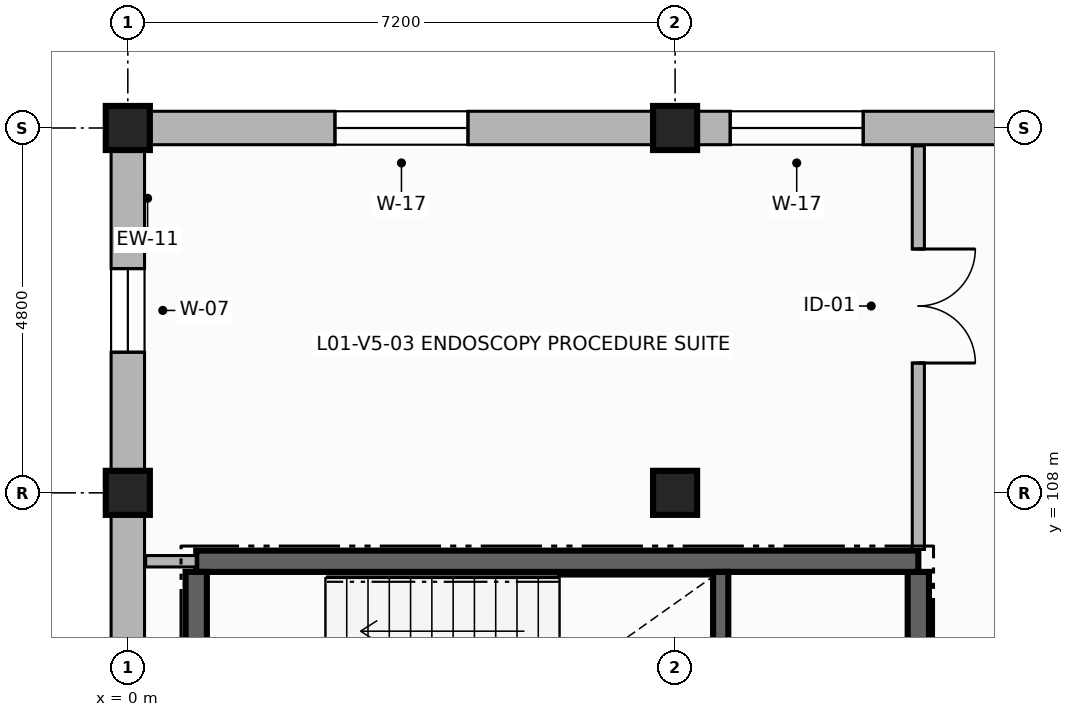
"""IFC4 building model, lengths in metres.
Left out: names, types, materials, properties, quantities, classifications, styles, units other than length and angle.
Written with IfcOpenShell. Run it as: python <this file> out.ifc"""

import sys

from ifc_helpers import new_model, si_unit, direction, frame, frame_2d, origin, origin_2d, place, context, subcontext, project, spatial, rectangle, extrude, element, fill, save


model = new_model("IFC4")
c1 = context("Model", 3, precision=1e-05, world=origin(), true_north=direction((0.0, 1.0)))
c2 = subcontext(c1, "Body", "Model", "MODEL_VIEW")
j1 = project(units=[si_unit("LENGTHUNIT", "METRE"), si_unit("PLANEANGLEUNIT", "RADIAN")], contexts=[c1])
p1 = place(None, origin())
s1 = spatial("IfcSite", under=j1, at=p1, CompositionType="ELEMENT")
p2 = place(p1, origin())
s2 = spatial("IfcBuilding", under=s1, at=p2, CompositionType="ELEMENT")
p3 = place(p2, frame((0.0, 0.0, 4.5)))
s3 = spatial("IfcBuildingStorey", under=s2, at=p3, CompositionType="ELEMENT", Elevation=4.5)
for number, where, z_axis, x_axis in (
    (1, (0.0, 108.0, 0.0), (0.0, 0.0, 1.0), (1.0, 0.0, 0.0)),
    (2, (0.0, 112.8, 0.0), (0.0, 0.0, 1.0), (1.0, 0.0, 0.0)),
    (3, (7.2, 108.0, 0.0), (0.0, 0.0, 1.0), (1.0, 0.0, 0.0)),
    (4, (7.2, 112.8, 0.0), (0.0, 0.0, 1.0), (1.0, 0.0, 0.0)),
):
    element("IfcColumn", number, at=place(p3, frame(where, z_axis=z_axis, x_axis=x_axis)), inside=s3, PredefinedType="COLUMN", context=c2, shape_type="SweptSolid", body=[
        extrude(rectangle(XDim=0.58, YDim=0.58, at=origin_2d()), origin(), (0.0, 0.0, 1.0), 3.59),
    ])
p4 = place(p3, frame((14.4, 112.8, 0.0), z_axis=(0.0, 0.0, 1.0), x_axis=(-1.0, 0.0, 0.0)))
e5 = element("IfcWall", 5, at=p4, inside=s3, PredefinedType="SOLIDWALL", context=c2, shape_type="SweptSolid", body=[
    extrude(rectangle(XDim=7.2, YDim=0.44, at=frame_2d((3.6, 0.0))), origin(), (0.0, 0.0, 1.0), 2.92),
])
p5 = place(p4, frame((4.725, 0.0, 0.9)))
e6 = element("IfcOpeningElement", 6, at=p5, cuts=e5, PredefinedType="OPENING", context=c2, shape_type="SweptSolid", body=[
    extrude(rectangle(XDim=1.75, YDim=1.8, at=frame_2d((0.875, 0.9))), frame((0.0, 0.23, 0.0), z_axis=(0.0, -1.0, 0.0), x_axis=(1.0, 0.0, 0.0)), (0.0, 0.0, 1.0), 0.46),
])
p6 = place(p3, frame((7.2, 112.8, 0.0), z_axis=(0.0, 0.0, 1.0), x_axis=(-1.0, 0.0, 0.0)))
e7 = element("IfcWall", 7, at=p6, inside=s3, PredefinedType="SOLIDWALL", context=c2, shape_type="SweptSolid", body=[
    extrude(rectangle(XDim=7.2, YDim=0.44, at=frame_2d((3.6, 0.0))), origin(), (0.0, 0.0, 1.0), 2.92),
])
p7 = place(p6, frame((2.725, 0.0, 0.9)))
e8 = element("IfcOpeningElement", 8, at=p7, cuts=e7, PredefinedType="OPENING", context=c2, shape_type="SweptSolid", body=[
    extrude(rectangle(XDim=1.75, YDim=1.8, at=frame_2d((0.875, 0.9))), frame((0.0, 0.23, 0.0), z_axis=(0.0, -1.0, 0.0), x_axis=(1.0, 0.0, 0.0)), (0.0, 0.0, 1.0), 0.46),
])
p8 = place(p3, frame((0.0, 112.8, 0.0), z_axis=(0.0, 0.0, 1.0), x_axis=(0.0, -1.0, 0.0)))
e9 = element("IfcWall", 9, at=p8, inside=s3, PredefinedType="SOLIDWALL", context=c2, shape_type="SweptSolid", body=[
    extrude(rectangle(XDim=4.8, YDim=0.44, at=frame_2d((2.4, 0.0))), origin(), (0.0, 0.0, 1.0), 2.92),
])
p9 = place(p8, frame((1.85, 0.0, 0.85)))
e10 = element("IfcOpeningElement", 10, at=p9, cuts=e9, PredefinedType="OPENING", context=c2, shape_type="SweptSolid", body=[
    extrude(rectangle(XDim=1.1, YDim=1.85, at=frame_2d((0.55, 0.925))), frame((0.0, 0.23, 0.0), z_axis=(0.0, -1.0, 0.0), x_axis=(1.0, 0.0, 0.0)), (0.0, 0.0, 1.0), 0.46),
])
p10 = place(p3, frame((0.0, 108.0, 0.0), z_axis=(0.0, 0.0, 1.0), x_axis=(0.0, -1.0, 0.0)))
e11 = element("IfcWall", 11, at=p10, inside=s3, PredefinedType="SOLIDWALL", context=c2, shape_type="SweptSolid", body=[
    extrude(rectangle(XDim=7.2, YDim=0.44, at=frame_2d((3.6, 0.0))), origin(), (0.0, 0.0, 1.0), 2.92),
])
p11 = place(p10, frame((3.025, 0.0, 0.9)))
e12 = element("IfcOpeningElement", 12, at=p11, cuts=e11, PredefinedType="OPENING", context=c2, shape_type="SweptSolid", body=[
    extrude(rectangle(XDim=1.55, YDim=1.8, at=frame_2d((0.775, 0.9))), frame((0.0, 0.23, 0.0), z_axis=(0.0, -1.0, 0.0), x_axis=(1.0, 0.0, 0.0)), (0.0, 0.0, 1.0), 0.46),
])
p12 = place(p3, frame((10.4, 101.44, 0.0), z_axis=(0.0, 0.0, 1.0), x_axis=(0.0, 1.0, 0.0)))
e13 = element("IfcWall", 13, at=p12, inside=s3, PredefinedType="SHEAR", context=c2, shape_type="SweptSolid", body=[
    extrude(rectangle(XDim=5.52, YDim=0.28, at=frame_2d((2.76, 0.0))), origin(), (0.0, 0.0, 1.0), 3.59),
])
p13 = place(p12, frame((0.32, 0.0, 0.0)))
e14 = element("IfcOpeningElement", 14, at=p13, cuts=e13, PredefinedType="OPENING", context=c2, shape_type="SweptSolid", body=[
    extrude(rectangle(XDim=1.15, YDim=2.2, at=frame_2d((0.575, 1.1))), frame((0.0, 0.15, 0.0), z_axis=(0.0, -1.0, 0.0), x_axis=(1.0, 0.0, 0.0)), (0.0, 0.0, 1.0), 0.3),
])
p14 = place(p3, frame((10.4, 107.1, 0.0), z_axis=(0.0, 0.0, 1.0), x_axis=(-1.0, 0.0, 0.0)))
e15 = element("IfcWall", 15, at=p14, inside=s3, PredefinedType="SHEAR", context=c2, shape_type="SweptSolid", body=[
    extrude(rectangle(XDim=9.5, YDim=0.28, at=frame_2d((4.75, 0.0))), origin(), (0.0, 0.0, 1.0), 3.59),
])
p15 = place(p3, frame((0.9, 106.96, 0.0), z_axis=(0.0, 0.0, 1.0), x_axis=(0.0, -1.0, 0.0)))
e16 = element("IfcWall", 16, at=p15, inside=s3, PredefinedType="SHEAR", context=c2, shape_type="SweptSolid", body=[
    extrude(rectangle(XDim=5.52, YDim=0.28, at=frame_2d((2.76, 0.0))), origin(), (0.0, 0.0, 1.0), 3.59),
])
p16 = place(p3, frame((7.8, 103.3, 0.0), z_axis=(0.0, 0.0, 1.0), x_axis=(0.0, 1.0, 0.0)))
e17 = element("IfcWall", 17, at=p16, inside=s3, PredefinedType="SHEAR", context=c2, shape_type="SweptSolid", body=[
    extrude(rectangle(XDim=3.66, YDim=0.2, at=frame_2d((1.83, 0.0))), origin(), (0.0, 0.0, 1.0), 3.59),
])
p17 = place(p3, frame((10.4, 112.565, 0.0), z_axis=(0.0, 0.0, 1.0), x_axis=(0.0, -1.0, 0.0)))
e18 = element("IfcWall", 18, at=p17, inside=s3, PredefinedType="PARTITIONING", context=c2, shape_type="SweptSolid", body=[
    extrude(rectangle(XDim=5.31, YDim=0.16, at=frame_2d((2.655, 0.0))), origin(), (0.0, 0.0, 1.0), 2.9),
])
p18 = place(p17, frame((1.357, 0.0, 0.0)))
e19 = element("IfcOpeningElement", 19, at=p18, cuts=e18, PredefinedType="OPENING", context=c2, shape_type="SweptSolid", body=[
    extrude(rectangle(XDim=1.5, YDim=2.3, at=frame_2d((0.75, 1.15))), frame((0.0, 0.09, 0.0), z_axis=(0.0, -1.0, 0.0), x_axis=(1.0, 0.0, 0.0)), (0.0, 0.0, 1.0), 0.18),
])
p19 = place(p3, frame((0.9, 107.1, 0.0), z_axis=(0.0, 0.0, 1.0), x_axis=(-1.0, 0.0, 0.0)))
e20 = element("IfcWall", 20, at=p19, inside=s3, PredefinedType="PARTITIONING", context=c2, shape_type="SweptSolid", body=[
    extrude(rectangle(XDim=0.665, YDim=0.15, at=frame_2d((0.333, 0.0))), origin(), (0.0, 0.0, 1.0), 2.9),
])
p20 = place(p5, origin())
e21 = element("IfcWindow", 21, at=p20, inside=s3, PartitioningType="SINGLE_PANEL", PredefinedType="WINDOW", context=c2, shape_type="SweptSolid", body=[
    extrude(rectangle(XDim=1.75, YDim=1.8, at=frame_2d((0.875, 0.9))), frame((0.0, 0.03, 0.0), z_axis=(0.0, -1.0, 0.0), x_axis=(1.0, 0.0, 0.0)), (0.0, 0.0, 1.0), 0.06),
])
fill(e6, e21)
p21 = place(p7, origin())
e22 = element("IfcWindow", 22, at=p21, inside=s3, PartitioningType="SINGLE_PANEL", PredefinedType="WINDOW", context=c2, shape_type="SweptSolid", body=[
    extrude(rectangle(XDim=1.75, YDim=1.8, at=frame_2d((0.875, 0.9))), frame((0.0, 0.03, 0.0), z_axis=(0.0, -1.0, 0.0), x_axis=(1.0, 0.0, 0.0)), (0.0, 0.0, 1.0), 0.06),
])
fill(e8, e22)
p22 = place(p9, origin())
e23 = element("IfcWindow", 23, at=p22, inside=s3, PartitioningType="SINGLE_PANEL", PredefinedType="WINDOW", context=c2, shape_type="SweptSolid", body=[
    extrude(rectangle(XDim=1.1, YDim=1.85, at=frame_2d((0.55, 0.925))), frame((0.0, 0.03, 0.0), z_axis=(0.0, -1.0, 0.0), x_axis=(1.0, 0.0, 0.0)), (0.0, 0.0, 1.0), 0.06),
])
fill(e10, e23)
p23 = place(p18, origin())
e24 = element("IfcDoor", 24, at=p23, inside=s3, OperationType="DOUBLE_DOOR_SINGLE_SWING", PredefinedType="DOOR", context=c2, shape_type="SweptSolid", body=[
    extrude(rectangle(XDim=1.5, YDim=2.3, at=frame_2d((0.75, 1.15))), frame((0.0, 0.025, 0.0), z_axis=(0.0, -1.0, 0.0), x_axis=(1.0, 0.0, 0.0)), (0.0, 0.0, 1.0), 0.05),
])
fill(e19, e24)
save(model, sys.argv[1])
